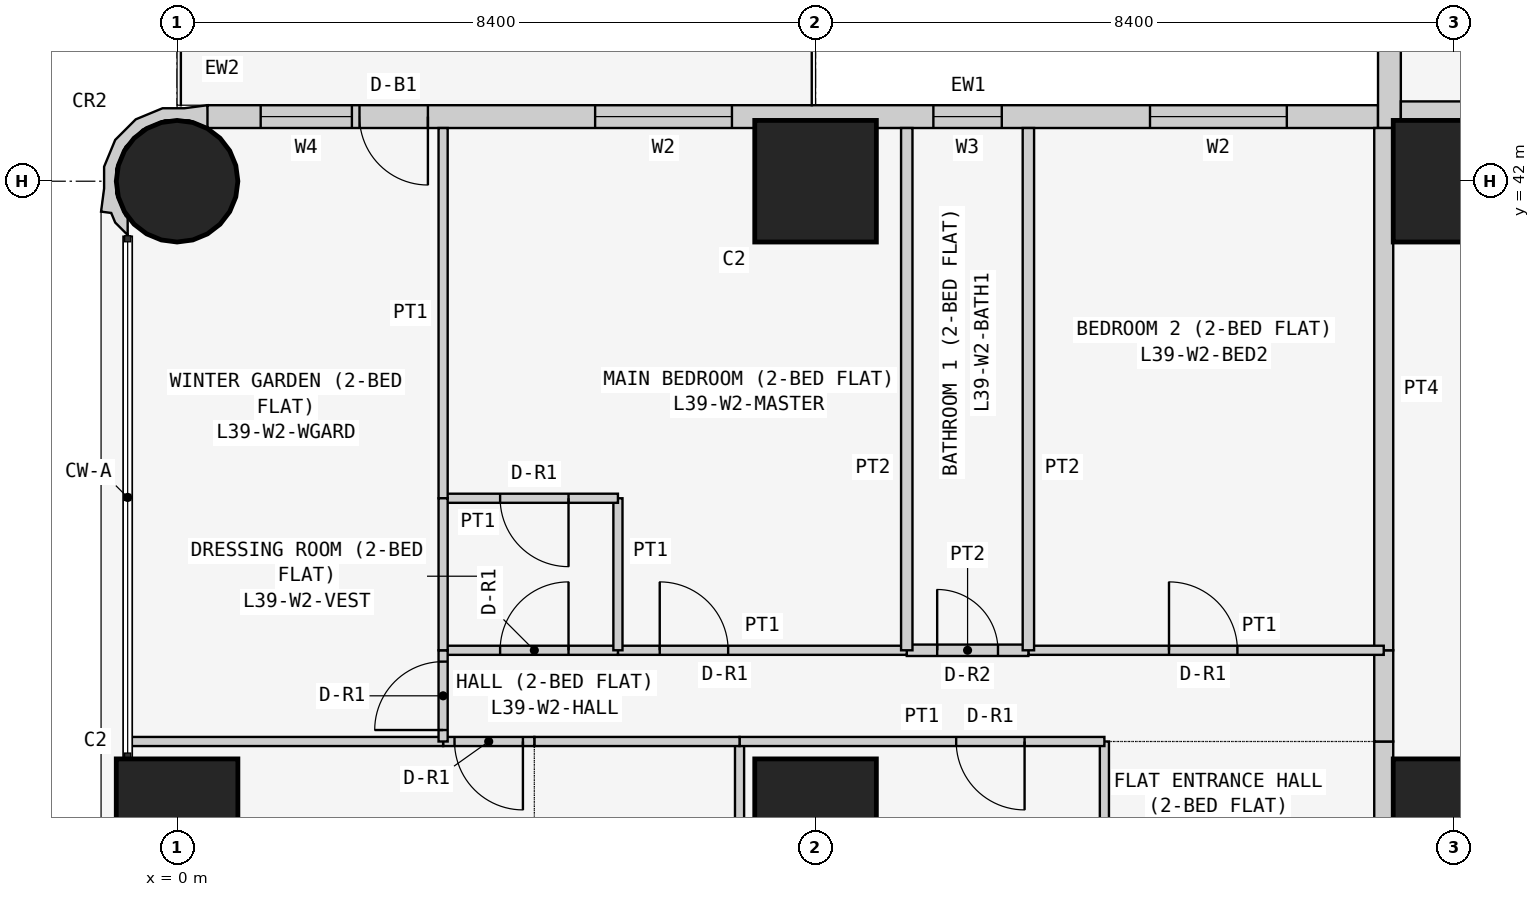
"""IFC4 building model, lengths in metres.
Left out: names, types, materials, properties, quantities, classifications, styles, units other than length and angle.
Written with IfcOpenShell. Run it as: python <this file> out.ifc"""

import sys

from ifc_helpers import new_model, si_unit, direction, frame, frame_2d, origin, origin_2d, place, context, subcontext, project, spatial, polyline, rectangle, circle, outline, extrude, element, fill, save


model = new_model("IFC4")
c1 = context("Model", 3, precision=1e-05, world=origin(), true_north=direction((0.0, 1.0)))
c2 = subcontext(c1, "Body", "Model", "MODEL_VIEW")
j1 = project(units=[si_unit("LENGTHUNIT", "METRE"), si_unit("PLANEANGLEUNIT", "RADIAN")], contexts=[c1])
p1 = place(None, origin())
s1 = spatial("IfcSite", under=j1, at=p1, CompositionType="ELEMENT")
p2 = place(p1, origin())
s2 = spatial("IfcBuilding", under=s1, at=p2, CompositionType="ELEMENT")
p3 = place(p2, frame((0.0, 0.0, 152.1)))
s3 = spatial("IfcBuildingStorey", under=s2, at=p3, CompositionType="ELEMENT", Elevation=152.1)
p4 = place(p3, frame((0.0, 33.6, 0.0), z_axis=(0.0, 0.0, 1.0), x_axis=(1.0, 0.0, 0.0)))
e1 = element("IfcColumn", 1, at=p4, inside=s3, PredefinedType="COLUMN", context=c2, shape_type="SweptSolid", body=[
    extrude(rectangle(XDim=1.6, YDim=1.6, at=origin_2d()), origin(), (0.0, 0.0, 1.0), 3.6),
])
p5 = place(p3, frame((0.0, 42.0, 0.0), z_axis=(0.0, 0.0, 1.0), x_axis=(1.0, 0.0, 0.0)))
e2 = element("IfcColumn", 2, at=p5, inside=s3, PredefinedType="COLUMN", context=c2, shape_type="SweptSolid", body=[
    extrude(circle(Radius=0.8, at=origin_2d()), origin(), (0.0, 0.0, 1.0), 3.6),
])
for number, where, z_axis, x_axis in (
    (3, (8.4, 33.6, 0.0), (0.0, 0.0, 1.0), (1.0, 0.0, 0.0)),
    (4, (8.4, 42.0, 0.0), (0.0, 0.0, 1.0), (1.0, 0.0, 0.0)),
    (5, (16.8, 33.6, 0.0), (0.0, 0.0, 1.0), (1.0, 0.0, 0.0)),
    (6, (16.8, 42.0, 0.0), (0.0, 0.0, 1.0), (1.0, 0.0, 0.0)),
):
    element("IfcColumn", number, at=place(p3, frame(where, z_axis=z_axis, x_axis=x_axis)), inside=s3, PredefinedType="COLUMN", context=c2, shape_type="SweptSolid", body=[
        extrude(rectangle(XDim=1.6, YDim=1.6, at=origin_2d()), origin(), (0.0, 0.0, 1.0), 3.6),
    ])
p6 = place(p3, frame((15.8, 42.85, 0.0), z_axis=(0.0, 0.0, 1.0), x_axis=(-1.0, 0.0, 0.0)))
e7 = element("IfcWall", 7, at=p6, inside=s3, PredefinedType="SOLIDWALL", context=c2, shape_type="SweptSolid", body=[
    extrude(rectangle(XDim=15.4, YDim=0.3, at=frame_2d((7.7, 0.0))), origin(), (0.0, 0.0, 1.0), 3.45),
])
p7 = place(p6, frame((1.2, 0.0, 0.9)))
e8 = element("IfcOpeningElement", 8, at=p7, cuts=e7, PredefinedType="OPENING", context=c2, shape_type="SweptSolid", body=[
    extrude(rectangle(XDim=1.8, YDim=1.5, at=frame_2d((0.9, 0.75))), frame((0.0, 0.16, 0.0), z_axis=(0.0, -1.0, 0.0), x_axis=(1.0, 0.0, 0.0)), (0.0, 0.0, 1.0), 0.32),
])
p8 = place(p6, frame((4.95, 0.0, 1.5)))
e9 = element("IfcOpeningElement", 9, at=p8, cuts=e7, PredefinedType="OPENING", context=c2, shape_type="SweptSolid", body=[
    extrude(rectangle(XDim=0.9, YDim=0.7, at=frame_2d((0.45, 0.35))), frame((0.0, 0.16, 0.0), z_axis=(0.0, -1.0, 0.0), x_axis=(1.0, 0.0, 0.0)), (0.0, 0.0, 1.0), 0.32),
])
p9 = place(p6, frame((8.5, 0.0, 0.9)))
e10 = element("IfcOpeningElement", 10, at=p9, cuts=e7, PredefinedType="OPENING", context=c2, shape_type="SweptSolid", body=[
    extrude(rectangle(XDim=1.8, YDim=1.5, at=frame_2d((0.9, 0.75))), frame((0.0, 0.16, 0.0), z_axis=(0.0, -1.0, 0.0), x_axis=(1.0, 0.0, 0.0)), (0.0, 0.0, 1.0), 0.32),
])
p10 = place(p6, frame((12.5, 0.0, 0.0)))
e11 = element("IfcOpeningElement", 11, at=p10, cuts=e7, PredefinedType="OPENING", context=c2, shape_type="SweptSolid", body=[
    extrude(rectangle(XDim=0.9, YDim=2.4, at=frame_2d((0.45, 1.2))), frame((0.0, 0.16, 0.0), z_axis=(0.0, -1.0, 0.0), x_axis=(1.0, 0.0, 0.0)), (0.0, 0.0, 1.0), 0.32),
])
p11 = place(p6, frame((13.5, 0.0, 0.9)))
e12 = element("IfcOpeningElement", 12, at=p11, cuts=e7, PredefinedType="OPENING", context=c2, shape_type="SweptSolid", body=[
    extrude(rectangle(XDim=1.2, YDim=1.5, at=frame_2d((0.6, 0.75))), frame((0.0, 0.16, 0.0), z_axis=(0.0, -1.0, 0.0), x_axis=(1.0, 0.0, 0.0)), (0.0, 0.0, 1.0), 0.32),
])
p12 = place(p3, frame((15.95, 50.0, 0.0), z_axis=(0.0, 0.0, 1.0), x_axis=(0.0, -1.0, 0.0)))
e13 = element("IfcWall", 13, at=p12, inside=s3, PredefinedType="SOLIDWALL", context=c2, shape_type="SweptSolid", body=[
    extrude(rectangle(XDim=7.3, YDim=0.3, at=frame_2d((3.65, 0.0))), origin(), (0.0, 0.0, 1.0), 3.45),
])
p13 = place(p12, frame((3.1, 0.0, 0.9)))
e14 = element("IfcOpeningElement", 14, at=p13, cuts=e13, PredefinedType="OPENING", context=c2, shape_type="SweptSolid", body=[
    extrude(rectangle(XDim=2.4, YDim=1.5, at=frame_2d((1.2, 0.75))), frame((0.0, 0.16, 0.0), z_axis=(0.0, -1.0, 0.0), x_axis=(1.0, 0.0, 0.0)), (0.0, 0.0, 1.0), 0.32),
])
p14 = place(p12, frame((0.75, 0.0, 0.9)))
e15 = element("IfcOpeningElement", 15, at=p14, cuts=e13, PredefinedType="OPENING", context=c2, shape_type="SweptSolid", body=[
    extrude(rectangle(XDim=1.2, YDim=1.5, at=frame_2d((0.6, 0.75))), frame((0.0, 0.16, 0.0), z_axis=(0.0, -1.0, 0.0), x_axis=(1.0, 0.0, 0.0)), (0.0, 0.0, 1.0), 0.32),
])
p15 = place(p3, frame((0.327, 42.817, 0.0), z_axis=(0.0, 0.0, 1.0), x_axis=(-0.93923434088, 0.343276641956, 0.0)))
e16 = element("IfcWall", 16, at=p15, inside=s3, PredefinedType="SOLIDWALL", context=c2, shape_type="SweptSolid", body=[
    extrude(outline(polyline([(-0.006, -0.197), (0.266, -0.055), (0.535, 0.044), (0.816, 0.302), (0.977, 0.648), (0.994, 1.03), (0.895, 1.299), (0.828, 1.598), (0.697, 1.569), (0.604, 1.67), (0.394, 1.767), (0.471, 1.556), (0.509, 1.539), (0.724, 1.304), (0.833, 1.005), (0.82, 0.687), (0.686, 0.397), (0.451, 0.182), (0.152, 0.073), (-0.116, 0.084), (-0.127, 0.078), (-0.146, 0.071), (-0.006, -0.197)])), origin(), (0.0, 0.0, 1.0), 3.45),
])
p16 = place(p3, frame((16.1, 42.925, 0.0), z_axis=(0.0, 0.0, 1.0), x_axis=(1.0, 0.0, 0.0)))
e17 = element("IfcWall", 17, at=p16, inside=s3, PredefinedType="PARTITIONING", context=c2, shape_type="SweptSolid", body=[
    extrude(rectangle(XDim=6.871, YDim=0.25, at=frame_2d((3.436, 0.0))), origin(), (0.0, 0.0, 1.0), 3.45),
])
p17 = place(p3, frame((15.875, 29.4, 0.0), z_axis=(0.0, 0.0, 1.0), x_axis=(0.0, 1.0, 0.0)))
e18 = element("IfcWall", 18, at=p17, inside=s3, PredefinedType="PARTITIONING", context=c2, shape_type="SweptSolid", body=[
    extrude(rectangle(XDim=5.229, YDim=0.25, at=frame_2d((2.615, 0.0))), origin(), (0.0, 0.0, 1.0), 3.45),
])
p18 = place(p17, frame((2.1, 0.0, 0.0)))
e19 = element("IfcOpeningElement", 19, at=p18, cuts=e18, PredefinedType="OPENING", context=c2, shape_type="SweptSolid", body=[
    extrude(rectangle(XDim=1.0, YDim=2.1, at=frame_2d((0.5, 1.05))), frame((0.0, 0.135, 0.0), z_axis=(0.0, -1.0, 0.0), x_axis=(1.0, 0.0, 0.0)), (0.0, 0.0, 1.0), 0.27),
])
p19 = place(p3, frame((15.875, 34.629, 0.0), z_axis=(0.0, 0.0, 1.0), x_axis=(0.0, 1.0, 0.0)))
e20 = element("IfcWall", 20, at=p19, inside=s3, PredefinedType="PARTITIONING", context=c2, shape_type="SweptSolid", body=[
    extrude(rectangle(XDim=1.2, YDim=0.25, at=frame_2d((0.6, 0.0))), origin(), (0.0, 0.0, 1.0), 3.45),
])
p20 = place(p3, frame((15.875, 35.829, 0.0), z_axis=(0.0, 0.0, 1.0), x_axis=(0.0, 1.0, 0.0)))
e21 = element("IfcWall", 21, at=p20, inside=s3, PredefinedType="PARTITIONING", context=c2, shape_type="SweptSolid", body=[
    extrude(rectangle(XDim=6.871, YDim=0.25, at=frame_2d((3.436, 0.0))), origin(), (0.0, 0.0, 1.0), 3.45),
])
for number, where, z_axis, x_axis in (
    (22, (12.2, 29.4, 0.0), (0.0, 0.0, 1.0), (0.0, 1.0, 0.0)),
    (23, (7.4, 29.4, 0.0), (0.0, 0.0, 1.0), (0.0, 1.0, 0.0)),
):
    element("IfcWall", number, at=place(p3, frame(where, z_axis=z_axis, x_axis=x_axis)), inside=s3, PredefinedType="PARTITIONING", context=c2, shape_type="SweptSolid", body=[
        extrude(rectangle(XDim=5.229, YDim=0.12, at=frame_2d((2.615, 0.0))), origin(), (0.0, 0.0, 1.0), 3.45),
    ])
p21 = place(p3, frame((7.4, 34.629, 0.0), z_axis=(0.0, 0.0, 1.0), x_axis=(1.0, 0.0, 0.0)))
e24 = element("IfcWall", 24, at=p21, inside=s3, PredefinedType="PARTITIONING", context=c2, shape_type="SweptSolid", body=[
    extrude(rectangle(XDim=4.8, YDim=0.12, at=frame_2d((2.4, 0.0))), origin(), (0.0, 0.0, 1.0), 3.45),
])
p22 = place(p21, frame((2.85, 0.0, 0.0)))
e25 = element("IfcOpeningElement", 25, at=p22, cuts=e24, PredefinedType="OPENING", context=c2, shape_type="SweptSolid", body=[
    extrude(rectangle(XDim=0.9, YDim=2.1, at=frame_2d((0.45, 1.05))), frame((0.0, 0.07, 0.0), z_axis=(0.0, -1.0, 0.0), x_axis=(1.0, 0.0, 0.0)), (0.0, 0.0, 1.0), 0.14),
])
p23 = place(p3, frame((4.7, 34.629, 0.0), z_axis=(0.0, 0.0, 1.0), x_axis=(1.0, 0.0, 0.0)))
e26 = element("IfcWall", 26, at=p23, inside=s3, PredefinedType="PARTITIONING", context=c2, shape_type="SweptSolid", body=[
    extrude(rectangle(XDim=2.7, YDim=0.12, at=frame_2d((1.35, 0.0))), origin(), (0.0, 0.0, 1.0), 3.45),
])
p24 = place(p3, frame((3.5, 34.629, 0.0), z_axis=(0.0, 0.0, 1.0), x_axis=(1.0, 0.0, 0.0)))
e27 = element("IfcWall", 27, at=p24, inside=s3, PredefinedType="PARTITIONING", context=c2, shape_type="SweptSolid", body=[
    extrude(rectangle(XDim=1.2, YDim=0.12, at=frame_2d((0.6, 0.0))), origin(), (0.0, 0.0, 1.0), 3.45),
])
p25 = place(p24, frame((0.15, 0.0, 0.0)))
e28 = element("IfcOpeningElement", 28, at=p25, cuts=e27, PredefinedType="OPENING", context=c2, shape_type="SweptSolid", body=[
    extrude(rectangle(XDim=0.9, YDim=2.1, at=frame_2d((0.45, 1.05))), frame((0.0, 0.07, 0.0), z_axis=(0.0, -1.0, 0.0), x_axis=(1.0, 0.0, 0.0)), (0.0, 0.0, 1.0), 0.14),
])
p26 = place(p3, frame((-0.65, 34.629, 0.0), z_axis=(0.0, 0.0, 1.0), x_axis=(1.0, 0.0, 0.0)))
e29 = element("IfcWall", 29, at=p26, inside=s3, PredefinedType="PARTITIONING", context=c2, shape_type="SweptSolid", body=[
    extrude(rectangle(XDim=4.15, YDim=0.12, at=frame_2d((2.075, 0.0))), origin(), (0.0, 0.0, 1.0), 3.45),
])
p27 = place(p3, frame((11.2, 35.829, 0.0), z_axis=(0.0, 0.0, 1.0), x_axis=(1.0, 0.0, 0.0)))
e30 = element("IfcWall", 30, at=p27, inside=s3, PredefinedType="PARTITIONING", context=c2, shape_type="SweptSolid", body=[
    extrude(rectangle(XDim=4.675, YDim=0.12, at=frame_2d((2.337, 0.0))), origin(), (0.0, 0.0, 1.0), 3.45),
])
p28 = place(p27, frame((1.85, 0.0, 0.0)))
e31 = element("IfcOpeningElement", 31, at=p28, cuts=e30, PredefinedType="OPENING", context=c2, shape_type="SweptSolid", body=[
    extrude(rectangle(XDim=0.9, YDim=2.1, at=frame_2d((0.45, 1.05))), frame((0.0, 0.07, 0.0), z_axis=(0.0, -1.0, 0.0), x_axis=(1.0, 0.0, 0.0)), (0.0, 0.0, 1.0), 0.14),
])
p29 = place(p3, frame((9.6, 35.829, 0.0), z_axis=(0.0, 0.0, 1.0), x_axis=(1.0, 0.0, 0.0)))
e32 = element("IfcWall", 32, at=p29, inside=s3, PredefinedType="PARTITIONING", context=c2, shape_type="SweptSolid", body=[
    extrude(rectangle(XDim=1.6, YDim=0.15, at=frame_2d((0.8, 0.0))), origin(), (0.0, 0.0, 1.0), 3.45),
])
p30 = place(p29, frame((0.4, 0.0, 0.0)))
e33 = element("IfcOpeningElement", 33, at=p30, cuts=e32, PredefinedType="OPENING", context=c2, shape_type="SweptSolid", body=[
    extrude(rectangle(XDim=0.8, YDim=2.1, at=frame_2d((0.4, 1.05))), frame((0.0, 0.085, 0.0), z_axis=(0.0, -1.0, 0.0), x_axis=(1.0, 0.0, 0.0)), (0.0, 0.0, 1.0), 0.17),
])
p31 = place(p3, frame((5.8, 35.829, 0.0), z_axis=(0.0, 0.0, 1.0), x_axis=(1.0, 0.0, 0.0)))
e34 = element("IfcWall", 34, at=p31, inside=s3, PredefinedType="PARTITIONING", context=c2, shape_type="SweptSolid", body=[
    extrude(rectangle(XDim=3.8, YDim=0.12, at=frame_2d((1.9, 0.0))), origin(), (0.0, 0.0, 1.0), 3.45),
])
p32 = place(p31, frame((0.55, 0.0, 0.0)))
e35 = element("IfcOpeningElement", 35, at=p32, cuts=e34, PredefinedType="OPENING", context=c2, shape_type="SweptSolid", body=[
    extrude(rectangle(XDim=0.9, YDim=2.1, at=frame_2d((0.45, 1.05))), frame((0.0, 0.07, 0.0), z_axis=(0.0, -1.0, 0.0), x_axis=(1.0, 0.0, 0.0)), (0.0, 0.0, 1.0), 0.14),
])
p33 = place(p3, frame((3.5, 35.829, 0.0), z_axis=(0.0, 0.0, 1.0), x_axis=(1.0, 0.0, 0.0)))
e36 = element("IfcWall", 36, at=p33, inside=s3, PredefinedType="PARTITIONING", context=c2, shape_type="SweptSolid", body=[
    extrude(rectangle(XDim=2.3, YDim=0.12, at=frame_2d((1.15, 0.0))), origin(), (0.0, 0.0, 1.0), 3.45),
])
p34 = place(p33, frame((0.75, 0.0, 0.0)))
e37 = element("IfcOpeningElement", 37, at=p34, cuts=e36, PredefinedType="OPENING", context=c2, shape_type="SweptSolid", body=[
    extrude(rectangle(XDim=0.9, YDim=2.1, at=frame_2d((0.45, 1.05))), frame((0.0, 0.07, 0.0), z_axis=(0.0, -1.0, 0.0), x_axis=(1.0, 0.0, 0.0)), (0.0, 0.0, 1.0), 0.14),
])
p35 = place(p3, frame((3.5, 34.629, 0.0), z_axis=(0.0, 0.0, 1.0), x_axis=(0.0, 1.0, 0.0)))
e38 = element("IfcWall", 38, at=p35, inside=s3, PredefinedType="PARTITIONING", context=c2, shape_type="SweptSolid", body=[
    extrude(rectangle(XDim=1.2, YDim=0.12, at=frame_2d((0.6, 0.0))), origin(), (0.0, 0.0, 1.0), 3.45),
])
p36 = place(p35, frame((0.151, 0.0, 0.0)))
e39 = element("IfcOpeningElement", 39, at=p36, cuts=e38, PredefinedType="OPENING", context=c2, shape_type="SweptSolid", body=[
    extrude(rectangle(XDim=0.9, YDim=2.1, at=frame_2d((0.45, 1.05))), frame((0.0, 0.07, 0.0), z_axis=(0.0, -1.0, 0.0), x_axis=(1.0, 0.0, 0.0)), (0.0, 0.0, 1.0), 0.14),
])
for number, where, z_axis, x_axis in (
    (40, (11.2, 35.829, 0.0), (0.0, 0.0, 1.0), (0.0, 1.0, 0.0)),
    (41, (9.6, 35.829, 0.0), (0.0, 0.0, 1.0), (0.0, 1.0, 0.0)),
):
    element("IfcWall", number, at=place(p3, frame(where, z_axis=z_axis, x_axis=x_axis)), inside=s3, PredefinedType="PARTITIONING", context=c2, shape_type="SweptSolid", body=[
        extrude(rectangle(XDim=6.871, YDim=0.15, at=frame_2d((3.436, 0.0))), origin(), (0.0, 0.0, 1.0), 3.45),
    ])
p37 = place(p3, frame((5.8, 35.829, 0.0), z_axis=(0.0, 0.0, 1.0), x_axis=(0.0, 1.0, 0.0)))
e42 = element("IfcWall", 42, at=p37, inside=s3, PredefinedType="PARTITIONING", context=c2, shape_type="SweptSolid", body=[
    extrude(rectangle(XDim=2.0, YDim=0.12, at=frame_2d((1.0, 0.0))), origin(), (0.0, 0.0, 1.0), 3.45),
])
p38 = place(p3, frame((5.8, 37.829, 0.0), z_axis=(0.0, 0.0, 1.0), x_axis=(-1.0, 0.0, 0.0)))
e43 = element("IfcWall", 43, at=p38, inside=s3, PredefinedType="PARTITIONING", context=c2, shape_type="SweptSolid", body=[
    extrude(rectangle(XDim=2.3, YDim=0.12, at=frame_2d((1.15, 0.0))), origin(), (0.0, 0.0, 1.0), 3.45),
])
p39 = place(p38, frame((0.65, 0.0, 0.0)))
e44 = element("IfcOpeningElement", 44, at=p39, cuts=e43, PredefinedType="OPENING", context=c2, shape_type="SweptSolid", body=[
    extrude(rectangle(XDim=0.9, YDim=2.1, at=frame_2d((0.45, 1.05))), frame((0.0, 0.07, 0.0), z_axis=(0.0, -1.0, 0.0), x_axis=(1.0, 0.0, 0.0)), (0.0, 0.0, 1.0), 0.14),
])
p40 = place(p3, frame((3.5, 37.829, 0.0), z_axis=(0.0, 0.0, 1.0), x_axis=(0.0, 1.0, 0.0)))
e45 = element("IfcWall", 45, at=p40, inside=s3, PredefinedType="PARTITIONING", context=c2, shape_type="SweptSolid", body=[
    extrude(rectangle(XDim=4.871, YDim=0.12, at=frame_2d((2.436, 0.0))), origin(), (0.0, 0.0, 1.0), 3.45),
])
p41 = place(p3, frame((3.5, 35.829, 0.0), z_axis=(0.0, 0.0, 1.0), x_axis=(0.0, 1.0, 0.0)))
e46 = element("IfcWall", 46, at=p41, inside=s3, PredefinedType="PARTITIONING", context=c2, shape_type="SweptSolid", body=[
    extrude(rectangle(XDim=2.0, YDim=0.12, at=frame_2d((1.0, 0.0))), origin(), (0.0, 0.0, 1.0), 3.45),
])
p42 = place(p7, origin())
e47 = element("IfcWindow", 47, at=p42, inside=s3, PartitioningType="SINGLE_PANEL", PredefinedType="WINDOW", context=c2, shape_type="SweptSolid", body=[
    extrude(rectangle(XDim=1.8, YDim=1.5, at=frame_2d((0.9, 0.75))), frame((0.0, 0.03, 0.0), z_axis=(0.0, -1.0, 0.0), x_axis=(1.0, 0.0, 0.0)), (0.0, 0.0, 1.0), 0.06),
])
fill(e8, e47)
p43 = place(p8, origin())
e48 = element("IfcWindow", 48, at=p43, inside=s3, PartitioningType="SINGLE_PANEL", PredefinedType="WINDOW", context=c2, shape_type="SweptSolid", body=[
    extrude(rectangle(XDim=0.9, YDim=0.7, at=frame_2d((0.45, 0.35))), frame((0.0, 0.03, 0.0), z_axis=(0.0, -1.0, 0.0), x_axis=(1.0, 0.0, 0.0)), (0.0, 0.0, 1.0), 0.06),
])
fill(e9, e48)
p44 = place(p9, origin())
e49 = element("IfcWindow", 49, at=p44, inside=s3, PartitioningType="SINGLE_PANEL", PredefinedType="WINDOW", context=c2, shape_type="SweptSolid", body=[
    extrude(rectangle(XDim=1.8, YDim=1.5, at=frame_2d((0.9, 0.75))), frame((0.0, 0.03, 0.0), z_axis=(0.0, -1.0, 0.0), x_axis=(1.0, 0.0, 0.0)), (0.0, 0.0, 1.0), 0.06),
])
fill(e10, e49)
p45 = place(p10, origin())
e50 = element("IfcDoor", 50, at=p45, inside=s3, OperationType="SINGLE_SWING_LEFT", PredefinedType="DOOR", context=c2, shape_type="SweptSolid", body=[
    extrude(rectangle(XDim=0.9, YDim=2.4, at=frame_2d((0.45, 1.2))), frame((0.0, 0.025, 0.0), z_axis=(0.0, -1.0, 0.0), x_axis=(1.0, 0.0, 0.0)), (0.0, 0.0, 1.0), 0.05),
])
fill(e11, e50)
p46 = place(p11, origin())
e51 = element("IfcWindow", 51, at=p46, inside=s3, PartitioningType="SINGLE_PANEL", PredefinedType="WINDOW", context=c2, shape_type="SweptSolid", body=[
    extrude(rectangle(XDim=1.2, YDim=1.5, at=frame_2d((0.6, 0.75))), frame((0.0, 0.03, 0.0), z_axis=(0.0, -1.0, 0.0), x_axis=(1.0, 0.0, 0.0)), (0.0, 0.0, 1.0), 0.06),
])
fill(e12, e51)
p47 = place(p22, frame((0.9, 0.0, 0.0), z_axis=(0.0, 0.0, 1.0), x_axis=(-1.0, 0.0, 0.0)))
e52 = element("IfcDoor", 52, at=p47, inside=s3, OperationType="SINGLE_SWING_LEFT", PredefinedType="DOOR", context=c2, shape_type="SweptSolid", body=[
    extrude(rectangle(XDim=0.9, YDim=2.1, at=frame_2d((0.45, 1.05))), frame((0.0, 0.025, 0.0), z_axis=(0.0, -1.0, 0.0), x_axis=(1.0, 0.0, 0.0)), (0.0, 0.0, 1.0), 0.05),
])
fill(e25, e52)
p48 = place(p25, frame((0.9, 0.0, 0.0), z_axis=(0.0, 0.0, 1.0), x_axis=(-1.0, 0.0, 0.0)))
e53 = element("IfcDoor", 53, at=p48, inside=s3, OperationType="SINGLE_SWING_LEFT", PredefinedType="DOOR", context=c2, shape_type="SweptSolid", body=[
    extrude(rectangle(XDim=0.9, YDim=2.1, at=frame_2d((0.45, 1.05))), frame((0.0, 0.025, 0.0), z_axis=(0.0, -1.0, 0.0), x_axis=(1.0, 0.0, 0.0)), (0.0, 0.0, 1.0), 0.05),
])
fill(e28, e53)
p49 = place(p28, origin())
e54 = element("IfcDoor", 54, at=p49, inside=s3, OperationType="SINGLE_SWING_LEFT", PredefinedType="DOOR", context=c2, shape_type="SweptSolid", body=[
    extrude(rectangle(XDim=0.9, YDim=2.1, at=frame_2d((0.45, 1.05))), frame((0.0, 0.025, 0.0), z_axis=(0.0, -1.0, 0.0), x_axis=(1.0, 0.0, 0.0)), (0.0, 0.0, 1.0), 0.05),
])
fill(e31, e54)
p50 = place(p30, origin())
e55 = element("IfcDoor", 55, at=p50, inside=s3, OperationType="SINGLE_SWING_LEFT", PredefinedType="DOOR", context=c2, shape_type="SweptSolid", body=[
    extrude(rectangle(XDim=0.8, YDim=2.1, at=frame_2d((0.4, 1.05))), frame((0.0, 0.025, 0.0), z_axis=(0.0, -1.0, 0.0), x_axis=(1.0, 0.0, 0.0)), (0.0, 0.0, 1.0), 0.05),
])
fill(e33, e55)
p51 = place(p32, origin())
e56 = element("IfcDoor", 56, at=p51, inside=s3, OperationType="SINGLE_SWING_LEFT", PredefinedType="DOOR", context=c2, shape_type="SweptSolid", body=[
    extrude(rectangle(XDim=0.9, YDim=2.1, at=frame_2d((0.45, 1.05))), frame((0.0, 0.025, 0.0), z_axis=(0.0, -1.0, 0.0), x_axis=(1.0, 0.0, 0.0)), (0.0, 0.0, 1.0), 0.05),
])
fill(e35, e56)
p52 = place(p34, origin())
e57 = element("IfcDoor", 57, at=p52, inside=s3, OperationType="SINGLE_SWING_RIGHT", PredefinedType="DOOR", context=c2, shape_type="SweptSolid", body=[
    extrude(rectangle(XDim=0.9, YDim=2.1, at=frame_2d((0.45, 1.05))), frame((0.0, 0.025, 0.0), z_axis=(0.0, -1.0, 0.0), x_axis=(1.0, 0.0, 0.0)), (0.0, 0.0, 1.0), 0.05),
])
fill(e37, e57)
p53 = place(p39, origin())
e58 = element("IfcDoor", 58, at=p53, inside=s3, OperationType="SINGLE_SWING_LEFT", PredefinedType="DOOR", context=c2, shape_type="SweptSolid", body=[
    extrude(rectangle(XDim=0.9, YDim=2.1, at=frame_2d((0.45, 1.05))), frame((0.0, 0.025, 0.0), z_axis=(0.0, -1.0, 0.0), x_axis=(1.0, 0.0, 0.0)), (0.0, 0.0, 1.0), 0.05),
])
fill(e44, e58)
p54 = place(p36, origin())
e59 = element("IfcDoor", 59, at=p54, inside=s3, OperationType="SINGLE_SWING_LEFT", PredefinedType="DOOR", context=c2, shape_type="SweptSolid", body=[
    extrude(rectangle(XDim=0.9, YDim=2.1, at=frame_2d((0.45, 1.05))), frame((0.0, 0.025, 0.0), z_axis=(0.0, -1.0, 0.0), x_axis=(1.0, 0.0, 0.0)), (0.0, 0.0, 1.0), 0.05),
])
fill(e39, e59)
save(model, sys.argv[1])
